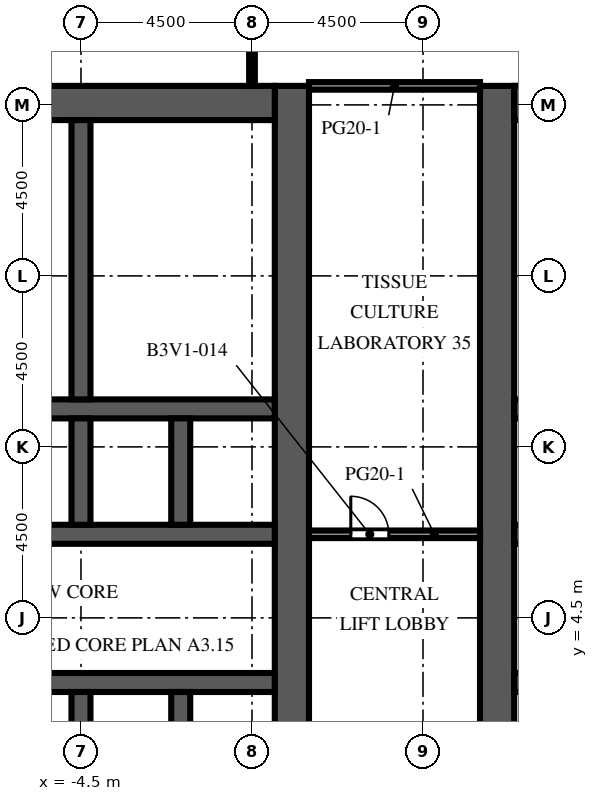
"""IFC4 building model, lengths in metres.
Left out: names, types, materials, properties, quantities, classifications, styles, units other than length and angle.
Written with IfcOpenShell. Run it as: python <this file> out.ifc"""

import sys

from ifc_helpers import new_model, si_unit, direction, frame, frame_2d, origin, place, context, subcontext, project, spatial, rectangle, extrude, element, fill, save


model = new_model("IFC4")
c1 = context("Model", 3, precision=1e-05, world=origin(), true_north=direction((0.0, 1.0)))
c2 = subcontext(c1, "Body", "Model", "MODEL_VIEW")
j1 = project(units=[si_unit("LENGTHUNIT", "METRE"), si_unit("PLANEANGLEUNIT", "RADIAN")], contexts=[c1])
p1 = place(None, origin())
s1 = spatial("IfcSite", under=j1, at=p1, CompositionType="ELEMENT")
p2 = place(p1, origin())
s2 = spatial("IfcBuilding", under=s1, at=p2, CompositionType="ELEMENT")
p3 = place(p2, frame((0.0, 0.0, 94.3)))
s3 = spatial("IfcBuildingStorey", under=s2, at=p3, CompositionType="ELEMENT", Elevation=94.3)
p4 = place(p3, frame((1.05, -9.0, 0.0), z_axis=(0.0, 0.0, 1.0), x_axis=(0.0, 1.0, 0.0)))
e1 = element("IfcWall", 1, at=p4, inside=s3, PredefinedType="SHEAR", context=c2, shape_type="SweptSolid", body=[
    extrude(rectangle(XDim=27.5, YDim=0.9, at=frame_2d((13.75, 0.0))), origin(), (0.0, 0.0, 1.0), 4.1),
])
p5 = place(p4, frame((12.55, 0.0, 0.0)))
e2 = element("IfcOpeningElement", 2, at=p5, cuts=e1, PredefinedType="OPENING", context=c2, shape_type="SweptSolid", body=[
    extrude(rectangle(XDim=2.4, YDim=2.4, at=frame_2d((1.2, 1.2))), frame((0.0, 0.46, 0.0), z_axis=(0.0, -1.0, 0.0), x_axis=(1.0, 0.0, 0.0)), (0.0, 0.0, 1.0), 0.92),
])
p6 = place(p4, frame((3.975, 0.0, 0.0)))
e3 = element("IfcOpeningElement", 3, at=p6, cuts=e1, PredefinedType="OPENING", context=c2, shape_type="SweptSolid", body=[
    extrude(rectangle(XDim=1.2, YDim=2.1, at=frame_2d((0.6, 1.05))), frame((0.0, 0.46, 0.0), z_axis=(0.0, -1.0, 0.0), x_axis=(1.0, 0.0, 0.0)), (0.0, 0.0, 1.0), 0.92),
])
p7 = place(p4, frame((22.325, 0.0, 0.0)))
e4 = element("IfcOpeningElement", 4, at=p7, cuts=e1, PredefinedType="OPENING", context=c2, shape_type="SweptSolid", body=[
    extrude(rectangle(XDim=1.2, YDim=2.1, at=frame_2d((0.6, 1.05))), frame((0.0, 0.46, 0.0), z_axis=(0.0, -1.0, 0.0), x_axis=(1.0, 0.0, 0.0)), (0.0, 0.0, 1.0), 0.92),
])
p8 = place(p3, frame((-9.6, 18.05, 0.0), z_axis=(0.0, 0.0, 1.0), x_axis=(1.0, 0.0, 0.0)))
e5 = element("IfcWall", 5, at=p8, inside=s3, PredefinedType="SHEAR", context=c2, shape_type="SweptSolid", body=[
    extrude(rectangle(XDim=10.2, YDim=0.9, at=frame_2d((5.1, 0.0))), origin(), (0.0, 0.0, 1.0), 4.1),
])
p9 = place(p3, frame((-9.6, 2.8, 0.0), z_axis=(0.0, 0.0, 1.0), x_axis=(1.0, 0.0, 0.0)))
e6 = element("IfcWall", 6, at=p9, inside=s3, PredefinedType="SHEAR", context=c2, shape_type="SweptSolid", body=[
    extrude(rectangle(XDim=10.2, YDim=0.5, at=frame_2d((5.1, 0.0))), origin(), (0.0, 0.0, 1.0), 4.1),
])
p10 = place(p9, frame((0.562, 0.0, 0.0)))
e7 = element("IfcOpeningElement", 7, at=p10, cuts=e6, PredefinedType="OPENING", context=c2, shape_type="SweptSolid", body=[
    extrude(rectangle(XDim=1.1, YDim=2.1, at=frame_2d((0.55, 1.05))), frame((0.0, 0.26, 0.0), z_axis=(0.0, -1.0, 0.0), x_axis=(1.0, 0.0, 0.0)), (0.0, 0.0, 1.0), 0.52),
])
p11 = place(p9, frame((3.238, 0.0, 0.0)))
e8 = element("IfcOpeningElement", 8, at=p11, cuts=e6, PredefinedType="OPENING", context=c2, shape_type="SweptSolid", body=[
    extrude(rectangle(XDim=1.1, YDim=2.1, at=frame_2d((0.55, 1.05))), frame((0.0, 0.26, 0.0), z_axis=(0.0, -1.0, 0.0), x_axis=(1.0, 0.0, 0.0)), (0.0, 0.0, 1.0), 0.52),
])
p12 = place(p9, frame((8.538, 0.0, 0.0)))
e9 = element("IfcOpeningElement", 9, at=p12, cuts=e6, PredefinedType="OPENING", context=c2, shape_type="SweptSolid", body=[
    extrude(rectangle(XDim=1.1, YDim=2.1, at=frame_2d((0.55, 1.05))), frame((0.0, 0.26, 0.0), z_axis=(0.0, -1.0, 0.0), x_axis=(1.0, 0.0, 0.0)), (0.0, 0.0, 1.0), 0.52),
])
p13 = place(p3, frame((-9.6, 6.7, 0.0), z_axis=(0.0, 0.0, 1.0), x_axis=(1.0, 0.0, 0.0)))
e10 = element("IfcWall", 10, at=p13, inside=s3, PredefinedType="SHEAR", context=c2, shape_type="SweptSolid", body=[
    extrude(rectangle(XDim=10.2, YDim=0.5, at=frame_2d((5.1, 0.0))), origin(), (0.0, 0.0, 1.0), 4.1),
])
p14 = place(p13, frame((0.562, 0.0, 0.0)))
e11 = element("IfcOpeningElement", 11, at=p14, cuts=e10, PredefinedType="OPENING", context=c2, shape_type="SweptSolid", body=[
    extrude(rectangle(XDim=1.1, YDim=2.1, at=frame_2d((0.55, 1.05))), frame((0.0, 0.26, 0.0), z_axis=(0.0, -1.0, 0.0), x_axis=(1.0, 0.0, 0.0)), (0.0, 0.0, 1.0), 0.52),
])
p15 = place(p13, frame((3.288, 0.0, 0.0)))
e12 = element("IfcOpeningElement", 12, at=p15, cuts=e10, PredefinedType="OPENING", context=c2, shape_type="SweptSolid", body=[
    extrude(rectangle(XDim=1.0, YDim=2.1, at=frame_2d((0.5, 1.05))), frame((0.0, 0.26, 0.0), z_axis=(0.0, -1.0, 0.0), x_axis=(1.0, 0.0, 0.0)), (0.0, 0.0, 1.0), 0.52),
])
p16 = place(p13, frame((5.913, 0.0, 0.0)))
e13 = element("IfcOpeningElement", 13, at=p16, cuts=e10, PredefinedType="OPENING", context=c2, shape_type="SweptSolid", body=[
    extrude(rectangle(XDim=1.0, YDim=2.1, at=frame_2d((0.5, 1.05))), frame((0.0, 0.26, 0.0), z_axis=(0.0, -1.0, 0.0), x_axis=(1.0, 0.0, 0.0)), (0.0, 0.0, 1.0), 0.52),
])
p17 = place(p13, frame((8.587, 0.0, 0.0)))
e14 = element("IfcOpeningElement", 14, at=p17, cuts=e10, PredefinedType="OPENING", context=c2, shape_type="SweptSolid", body=[
    extrude(rectangle(XDim=1.0, YDim=2.1, at=frame_2d((0.5, 1.05))), frame((0.0, 0.26, 0.0), z_axis=(0.0, -1.0, 0.0), x_axis=(1.0, 0.0, 0.0)), (0.0, 0.0, 1.0), 0.52),
])
p18 = place(p3, frame((-9.6, 10.0, 0.0), z_axis=(0.0, 0.0, 1.0), x_axis=(1.0, 0.0, 0.0)))
e15 = element("IfcWall", 15, at=p18, inside=s3, PredefinedType="SHEAR", context=c2, shape_type="SweptSolid", body=[
    extrude(rectangle(XDim=10.2, YDim=0.5, at=frame_2d((5.1, 0.0))), origin(), (0.0, 0.0, 1.0), 4.1),
])
for number, where, z_axis, x_axis in (
    (16, (-4.5, -0.25, 0.0), (0.0, 0.0, 1.0), (0.0, 1.0, 0.0)),
    (17, (-4.5, 6.95, 0.0), (0.0, 0.0, 1.0), (0.0, 1.0, 0.0)),
    (18, (-1.875, -0.25, 0.0), (0.0, 0.0, 1.0), (0.0, 1.0, 0.0)),
    (19, (-1.875, 6.95, 0.0), (0.0, 0.0, 1.0), (0.0, 1.0, 0.0)),
):
    element("IfcWall", number, at=place(p3, frame(where, z_axis=z_axis, x_axis=x_axis)), inside=s3, PredefinedType="SHEAR", context=c2, shape_type="SweptSolid", body=[
        extrude(rectangle(XDim=2.8, YDim=0.5, at=frame_2d((1.4, 0.0))), origin(), (0.0, 0.0, 1.0), 4.1),
    ])
p19 = place(p3, frame((-4.5, 10.25, 0.0), z_axis=(0.0, 0.0, 1.0), x_axis=(0.0, 1.0, 0.0)))
e20 = element("IfcWall", 20, at=p19, inside=s3, PredefinedType="SHEAR", context=c2, shape_type="SweptSolid", body=[
    extrude(rectangle(XDim=7.35, YDim=0.5, at=frame_2d((3.675, 0.0))), origin(), (0.0, 0.0, 1.0), 4.1),
])
p20 = place(p3, frame((6.45, -9.0, 0.0), z_axis=(0.0, 0.0, 1.0), x_axis=(0.0, 1.0, 0.0)))
e21 = element("IfcWall", 21, at=p20, inside=s3, PredefinedType="SHEAR", context=c2, shape_type="SweptSolid", body=[
    extrude(rectangle(XDim=27.5, YDim=0.9, at=frame_2d((13.75, 0.0))), origin(), (0.0, 0.0, 1.0), 4.1),
])
p21 = place(p20, frame((12.55, 0.0, 0.0)))
e22 = element("IfcOpeningElement", 22, at=p21, cuts=e21, PredefinedType="OPENING", context=c2, shape_type="SweptSolid", body=[
    extrude(rectangle(XDim=2.4, YDim=2.4, at=frame_2d((1.2, 1.2))), frame((0.0, 0.46, 0.0), z_axis=(0.0, -1.0, 0.0), x_axis=(1.0, 0.0, 0.0)), (0.0, 0.0, 1.0), 0.92),
])
p22 = place(p20, frame((3.975, 0.0, 0.0)))
e23 = element("IfcOpeningElement", 23, at=p22, cuts=e21, PredefinedType="OPENING", context=c2, shape_type="SweptSolid", body=[
    extrude(rectangle(XDim=1.2, YDim=2.1, at=frame_2d((0.6, 1.05))), frame((0.0, 0.46, 0.0), z_axis=(0.0, -1.0, 0.0), x_axis=(1.0, 0.0, 0.0)), (0.0, 0.0, 1.0), 0.92),
])
p23 = place(p20, frame((22.325, 0.0, 0.0)))
e24 = element("IfcOpeningElement", 24, at=p23, cuts=e21, PredefinedType="OPENING", context=c2, shape_type="SweptSolid", body=[
    extrude(rectangle(XDim=1.2, YDim=2.1, at=frame_2d((0.6, 1.05))), frame((0.0, 0.46, 0.0), z_axis=(0.0, -1.0, 0.0), x_axis=(1.0, 0.0, 0.0)), (0.0, 0.0, 1.0), 0.92),
])
p24 = place(p3, frame((6.9, 18.05, 0.0), z_axis=(0.0, 0.0, 1.0), x_axis=(1.0, 0.0, 0.0)))
e25 = element("IfcWall", 25, at=p24, inside=s3, PredefinedType="SHEAR", context=c2, shape_type="SweptSolid", body=[
    extrude(rectangle(XDim=10.2, YDim=0.9, at=frame_2d((5.1, 0.0))), origin(), (0.0, 0.0, 1.0), 4.1),
])
p25 = place(p3, frame((6.9, 2.8, 0.0), z_axis=(0.0, 0.0, 1.0), x_axis=(1.0, 0.0, 0.0)))
e26 = element("IfcWall", 26, at=p25, inside=s3, PredefinedType="SHEAR", context=c2, shape_type="SweptSolid", body=[
    extrude(rectangle(XDim=10.2, YDim=0.5, at=frame_2d((5.1, 0.0))), origin(), (0.0, 0.0, 1.0), 4.1),
])
p26 = place(p25, frame((0.562, 0.0, 0.0)))
e27 = element("IfcOpeningElement", 27, at=p26, cuts=e26, PredefinedType="OPENING", context=c2, shape_type="SweptSolid", body=[
    extrude(rectangle(XDim=1.1, YDim=2.1, at=frame_2d((0.55, 1.05))), frame((0.0, 0.26, 0.0), z_axis=(0.0, -1.0, 0.0), x_axis=(1.0, 0.0, 0.0)), (0.0, 0.0, 1.0), 0.52),
])
p27 = place(p25, frame((3.238, 0.0, 0.0)))
e28 = element("IfcOpeningElement", 28, at=p27, cuts=e26, PredefinedType="OPENING", context=c2, shape_type="SweptSolid", body=[
    extrude(rectangle(XDim=1.1, YDim=2.1, at=frame_2d((0.55, 1.05))), frame((0.0, 0.26, 0.0), z_axis=(0.0, -1.0, 0.0), x_axis=(1.0, 0.0, 0.0)), (0.0, 0.0, 1.0), 0.52),
])
p28 = place(p25, frame((8.538, 0.0, 0.0)))
e29 = element("IfcOpeningElement", 29, at=p28, cuts=e26, PredefinedType="OPENING", context=c2, shape_type="SweptSolid", body=[
    extrude(rectangle(XDim=1.1, YDim=2.1, at=frame_2d((0.55, 1.05))), frame((0.0, 0.26, 0.0), z_axis=(0.0, -1.0, 0.0), x_axis=(1.0, 0.0, 0.0)), (0.0, 0.0, 1.0), 0.52),
])
p29 = place(p3, frame((6.9, 6.7, 0.0), z_axis=(0.0, 0.0, 1.0), x_axis=(1.0, 0.0, 0.0)))
e30 = element("IfcWall", 30, at=p29, inside=s3, PredefinedType="SHEAR", context=c2, shape_type="SweptSolid", body=[
    extrude(rectangle(XDim=10.2, YDim=0.5, at=frame_2d((5.1, 0.0))), origin(), (0.0, 0.0, 1.0), 4.1),
])
p30 = place(p29, frame((0.562, 0.0, 0.0)))
e31 = element("IfcOpeningElement", 31, at=p30, cuts=e30, PredefinedType="OPENING", context=c2, shape_type="SweptSolid", body=[
    extrude(rectangle(XDim=1.1, YDim=2.1, at=frame_2d((0.55, 1.05))), frame((0.0, 0.26, 0.0), z_axis=(0.0, -1.0, 0.0), x_axis=(1.0, 0.0, 0.0)), (0.0, 0.0, 1.0), 0.52),
])
p31 = place(p29, frame((3.288, 0.0, 0.0)))
e32 = element("IfcOpeningElement", 32, at=p31, cuts=e30, PredefinedType="OPENING", context=c2, shape_type="SweptSolid", body=[
    extrude(rectangle(XDim=1.0, YDim=2.1, at=frame_2d((0.5, 1.05))), frame((0.0, 0.26, 0.0), z_axis=(0.0, -1.0, 0.0), x_axis=(1.0, 0.0, 0.0)), (0.0, 0.0, 1.0), 0.52),
])
p32 = place(p29, frame((5.913, 0.0, 0.0)))
e33 = element("IfcOpeningElement", 33, at=p32, cuts=e30, PredefinedType="OPENING", context=c2, shape_type="SweptSolid", body=[
    extrude(rectangle(XDim=1.0, YDim=2.1, at=frame_2d((0.5, 1.05))), frame((0.0, 0.26, 0.0), z_axis=(0.0, -1.0, 0.0), x_axis=(1.0, 0.0, 0.0)), (0.0, 0.0, 1.0), 0.52),
])
p33 = place(p29, frame((8.587, 0.0, 0.0)))
e34 = element("IfcOpeningElement", 34, at=p33, cuts=e30, PredefinedType="OPENING", context=c2, shape_type="SweptSolid", body=[
    extrude(rectangle(XDim=1.0, YDim=2.1, at=frame_2d((0.5, 1.05))), frame((0.0, 0.26, 0.0), z_axis=(0.0, -1.0, 0.0), x_axis=(1.0, 0.0, 0.0)), (0.0, 0.0, 1.0), 0.52),
])
p34 = place(p3, frame((6.9, 10.0, 0.0), z_axis=(0.0, 0.0, 1.0), x_axis=(1.0, 0.0, 0.0)))
e35 = element("IfcWall", 35, at=p34, inside=s3, PredefinedType="SHEAR", context=c2, shape_type="SweptSolid", body=[
    extrude(rectangle(XDim=10.2, YDim=0.5, at=frame_2d((5.1, 0.0))), origin(), (0.0, 0.0, 1.0), 4.1),
])
p35 = place(p3, frame((-0.8, 10.25, 0.0), z_axis=(0.0, 0.0, 1.0), x_axis=(0.0, 1.0, 0.0)))
e36 = element("IfcWall", 36, at=p35, inside=s3, PredefinedType="PARTITIONING", context=c2, shape_type="SweptSolid", body=[
    extrude(rectangle(XDim=2.205, YDim=0.1, at=frame_2d((1.103, 0.0))), origin(), (0.0, 0.0, 1.0), 3.65),
])
p36 = place(p35, frame((0.603, 0.0, 0.0)))
e37 = element("IfcOpeningElement", 37, at=p36, cuts=e36, PredefinedType="OPENING", context=c2, shape_type="SweptSolid", body=[
    extrude(rectangle(XDim=1.0, YDim=2.1, at=frame_2d((0.5, 1.05))), frame((0.0, 0.06, 0.0), z_axis=(0.0, -1.0, 0.0), x_axis=(1.0, 0.0, 0.0)), (0.0, 0.0, 1.0), 0.12),
])
p37 = place(p3, frame((-0.8, 12.455, 0.0), z_axis=(0.0, 0.0, 1.0), x_axis=(0.0, 1.0, 0.0)))
e38 = element("IfcWall", 38, at=p37, inside=s3, PredefinedType="PARTITIONING", context=c2, shape_type="SweptSolid", body=[
    extrude(rectangle(XDim=2.352, YDim=0.1, at=frame_2d((1.176, 0.0))), origin(), (0.0, 0.0, 1.0), 3.65),
])
p38 = place(p37, frame((0.676, 0.0, 0.0)))
e39 = element("IfcOpeningElement", 39, at=p38, cuts=e38, PredefinedType="OPENING", context=c2, shape_type="SweptSolid", body=[
    extrude(rectangle(XDim=1.0, YDim=2.1, at=frame_2d((0.5, 1.05))), frame((0.0, 0.06, 0.0), z_axis=(0.0, -1.0, 0.0), x_axis=(1.0, 0.0, 0.0)), (0.0, 0.0, 1.0), 0.12),
])
p39 = place(p3, frame((-0.8, 14.807, 0.0), z_axis=(0.0, 0.0, 1.0), x_axis=(0.0, 1.0, 0.0)))
e40 = element("IfcWall", 40, at=p39, inside=s3, PredefinedType="PARTITIONING", context=c2, shape_type="SweptSolid", body=[
    extrude(rectangle(XDim=2.793, YDim=0.1, at=frame_2d((1.396, 0.0))), origin(), (0.0, 0.0, 1.0), 3.65),
])
p40 = place(p39, frame((0.896, 0.0, 0.0)))
e41 = element("IfcOpeningElement", 41, at=p40, cuts=e40, PredefinedType="OPENING", context=c2, shape_type="SweptSolid", body=[
    extrude(rectangle(XDim=1.0, YDim=2.1, at=frame_2d((0.5, 1.05))), frame((0.0, 0.06, 0.0), z_axis=(0.0, -1.0, 0.0), x_axis=(1.0, 0.0, 0.0)), (0.0, 0.0, 1.0), 0.12),
])
for number, where, z_axis, x_axis in (
    (42, (-4.25, 12.455, 0.0), (0.0, 0.0, 1.0), (1.0, 0.0, 0.0)),
    (43, (-4.25, 14.807, 0.0), (0.0, 0.0, 1.0), (1.0, 0.0, 0.0)),
):
    element("IfcWall", number, at=place(p3, frame(where, z_axis=z_axis, x_axis=x_axis)), inside=s3, PredefinedType="PARTITIONING", context=c2, shape_type="SweptSolid", body=[
        extrude(rectangle(XDim=3.45, YDim=0.1, at=frame_2d((1.725, 0.0))), origin(), (0.0, 0.0, 1.0), 3.65),
    ])
p41 = place(p3, frame((0.0, 18.5, 0.0), z_axis=(0.0, 0.0, 1.0), x_axis=(0.0, 1.0, 0.0)))
e44 = element("IfcWall", 44, at=p41, inside=s3, PredefinedType="PARTITIONING", context=c2, shape_type="SweptSolid", body=[
    extrude(rectangle(XDim=3.3, YDim=0.15, at=frame_2d((1.65, 0.0))), origin(), (0.0, 0.0, 1.0), 3.65),
])
p42 = place(p3, frame((1.5, 6.7, 0.0), z_axis=(0.0, 0.0, 1.0), x_axis=(1.0, 0.0, 0.0)))
e45 = element("IfcWall", 45, at=p42, inside=s3, PredefinedType="PARTITIONING", context=c2, shape_type="SweptSolid", body=[
    extrude(rectangle(XDim=4.5, YDim=0.2, at=frame_2d((2.25, 0.0))), origin(), (0.0, 0.0, 1.0), 3.65),
])
p43 = place(p42, frame((1.1, 0.0, 0.0)))
e46 = element("IfcOpeningElement", 46, at=p43, cuts=e45, PredefinedType="OPENING", context=c2, shape_type="SweptSolid", body=[
    extrude(rectangle(XDim=1.0, YDim=2.1, at=frame_2d((0.5, 1.05))), frame((0.0, 0.11, 0.0), z_axis=(0.0, -1.0, 0.0), x_axis=(1.0, 0.0, 0.0)), (0.0, 0.0, 1.0), 0.22),
])
p44 = place(p3, frame((1.5, 18.5, 0.0), z_axis=(0.0, 0.0, 1.0), x_axis=(1.0, 0.0, 0.0)))
e47 = element("IfcWall", 47, at=p44, inside=s3, PredefinedType="PARTITIONING", context=c2, shape_type="SweptSolid", body=[
    extrude(rectangle(XDim=4.5, YDim=0.2, at=frame_2d((2.25, 0.0))), origin(), (0.0, 0.0, 1.0), 3.65),
])
p45 = place(p12, origin())
e48 = element("IfcDoor", 48, at=p45, inside=s3, OperationType="DOUBLE_DOOR_SLIDING", PredefinedType="DOOR", context=c2, shape_type="SweptSolid", body=[
    extrude(rectangle(XDim=1.1, YDim=2.1, at=frame_2d((0.55, 1.05))), frame((0.0, 0.025, 0.0), z_axis=(0.0, -1.0, 0.0), x_axis=(1.0, 0.0, 0.0)), (0.0, 0.0, 1.0), 0.05),
])
fill(e9, e48)
p46 = place(p5, origin())
e49 = element("IfcDoor", 49, at=p46, inside=s3, OperationType="DOUBLE_DOOR_DOUBLE_SWING", PredefinedType="DOOR", context=c2, shape_type="SweptSolid", body=[
    extrude(rectangle(XDim=2.4, YDim=2.4, at=frame_2d((1.2, 1.2))), frame((0.0, 0.025, 0.0), z_axis=(0.0, -1.0, 0.0), x_axis=(1.0, 0.0, 0.0)), (0.0, 0.0, 1.0), 0.05),
])
fill(e2, e49)
p47 = place(p21, origin())
e50 = element("IfcDoor", 50, at=p47, inside=s3, OperationType="DOUBLE_DOOR_DOUBLE_SWING", PredefinedType="DOOR", context=c2, shape_type="SweptSolid", body=[
    extrude(rectangle(XDim=2.4, YDim=2.4, at=frame_2d((1.2, 1.2))), frame((0.0, 0.025, 0.0), z_axis=(0.0, -1.0, 0.0), x_axis=(1.0, 0.0, 0.0)), (0.0, 0.0, 1.0), 0.05),
])
fill(e22, e50)
p48 = place(p16, origin())
e51 = element("IfcDoor", 51, at=p48, inside=s3, OperationType="SINGLE_SWING_LEFT", PredefinedType="DOOR", context=c2, shape_type="SweptSolid", body=[
    extrude(rectangle(XDim=1.0, YDim=2.1, at=frame_2d((0.5, 1.05))), frame((0.0, 0.025, 0.0), z_axis=(0.0, -1.0, 0.0), x_axis=(1.0, 0.0, 0.0)), (0.0, 0.0, 1.0), 0.05),
])
fill(e13, e51)
p49 = place(p17, origin())
e52 = element("IfcDoor", 52, at=p49, inside=s3, OperationType="SINGLE_SWING_RIGHT", PredefinedType="DOOR", context=c2, shape_type="SweptSolid", body=[
    extrude(rectangle(XDim=1.0, YDim=2.1, at=frame_2d((0.5, 1.05))), frame((0.0, 0.025, 0.0), z_axis=(0.0, -1.0, 0.0), x_axis=(1.0, 0.0, 0.0)), (0.0, 0.0, 1.0), 0.05),
])
fill(e14, e52)
p50 = place(p7, origin())
e53 = element("IfcDoor", 53, at=p50, inside=s3, OperationType="SINGLE_SWING_LEFT", PredefinedType="DOOR", context=c2, shape_type="SweptSolid", body=[
    extrude(rectangle(XDim=1.2, YDim=2.1, at=frame_2d((0.6, 1.05))), frame((0.0, 0.425, 0.0), z_axis=(0.0, -1.0, 0.0), x_axis=(1.0, 0.0, 0.0)), (0.0, 0.0, 1.0), 0.05),
])
fill(e4, e53)
p51 = place(p36, origin())
e54 = element("IfcDoor", 54, at=p51, inside=s3, OperationType="SINGLE_SWING_RIGHT", PredefinedType="DOOR", context=c2, shape_type="SweptSolid", body=[
    extrude(rectangle(XDim=1.0, YDim=2.1, at=frame_2d((0.5, 1.05))), frame((0.0, 0.025, 0.0), z_axis=(0.0, -1.0, 0.0), x_axis=(1.0, 0.0, 0.0)), (0.0, 0.0, 1.0), 0.05),
])
fill(e37, e54)
p52 = place(p38, origin())
e55 = element("IfcDoor", 55, at=p52, inside=s3, OperationType="SINGLE_SWING_LEFT", PredefinedType="DOOR", context=c2, shape_type="SweptSolid", body=[
    extrude(rectangle(XDim=1.0, YDim=2.1, at=frame_2d((0.5, 1.05))), frame((0.0, 0.025, 0.0), z_axis=(0.0, -1.0, 0.0), x_axis=(1.0, 0.0, 0.0)), (0.0, 0.0, 1.0), 0.05),
])
fill(e39, e55)
p53 = place(p40, origin())
e56 = element("IfcDoor", 56, at=p53, inside=s3, OperationType="SINGLE_SWING_RIGHT", PredefinedType="DOOR", context=c2, shape_type="SweptSolid", body=[
    extrude(rectangle(XDim=1.0, YDim=2.1, at=frame_2d((0.5, 1.05))), frame((0.0, 0.025, 0.0), z_axis=(0.0, -1.0, 0.0), x_axis=(1.0, 0.0, 0.0)), (0.0, 0.0, 1.0), 0.05),
])
fill(e41, e56)
p54 = place(p23, origin())
e57 = element("IfcDoor", 57, at=p54, inside=s3, OperationType="SINGLE_SWING_RIGHT", PredefinedType="DOOR", context=c2, shape_type="SweptSolid", body=[
    extrude(rectangle(XDim=1.2, YDim=2.1, at=frame_2d((0.6, 1.05))), frame((0.0, -0.375, 0.0), z_axis=(0.0, -1.0, 0.0), x_axis=(1.0, 0.0, 0.0)), (0.0, 0.0, 1.0), 0.05),
])
fill(e24, e57)
p55 = place(p43, origin())
e58 = element("IfcDoor", 58, at=p55, inside=s3, OperationType="SINGLE_SWING_LEFT", PredefinedType="DOOR", context=c2, shape_type="SweptSolid", body=[
    extrude(rectangle(XDim=1.0, YDim=2.1, at=frame_2d((0.5, 1.05))), frame((0.0, 0.025, 0.0), z_axis=(0.0, -1.0, 0.0), x_axis=(1.0, 0.0, 0.0)), (0.0, 0.0, 1.0), 0.05),
])
fill(e46, e58)
save(model, sys.argv[1])
